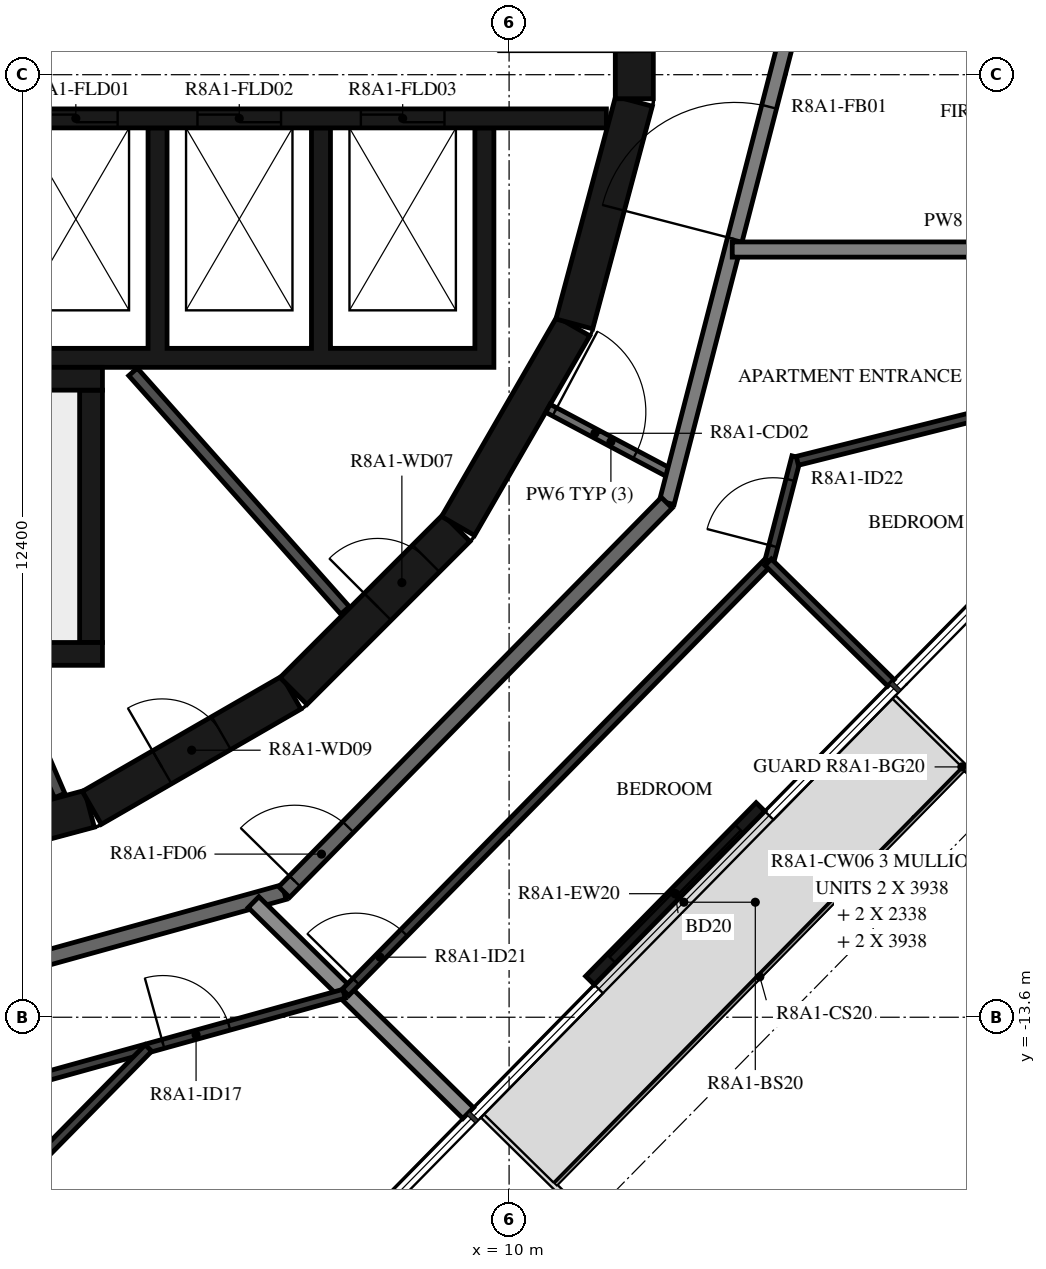
"""IFC4 building model, lengths in metres.
Left out: names, types, materials, properties, quantities, classifications, styles, units other than length and angle.
Written with IfcOpenShell. Run it as: python <this file> out.ifc"""

import sys

from ifc_helpers import new_model, si_unit, direction, frame, frame_2d, origin, place, context, subcontext, project, spatial, polyline, rectangle, outline, extrude, element, fill, save


model = new_model("IFC4")
c1 = context("Model", 3, precision=1e-05, world=origin(), true_north=direction((0.0, 1.0)))
c2 = subcontext(c1, "Body", "Model", "MODEL_VIEW")
j1 = project(units=[si_unit("LENGTHUNIT", "METRE"), si_unit("PLANEANGLEUNIT", "RADIAN")], contexts=[c1])
p1 = place(None, origin())
s1 = spatial("IfcSite", under=j1, at=p1, CompositionType="ELEMENT")
p2 = place(p1, origin())
s2 = spatial("IfcBuilding", under=s1, at=p2, CompositionType="ELEMENT")
p3 = place(p2, frame((0.0, 0.0, 301.7)))
s3 = spatial("IfcBuildingStorey", under=s2, at=p3, CompositionType="ELEMENT", Elevation=301.7)
p4 = place(p3, frame((11.064, -13.116, 0.0), z_axis=(0.0, 0.0, 1.0), x_axis=(0.700900076932, 0.713259477439, 0.0)))
e1 = element("IfcWall", 1, at=p4, inside=s3, PredefinedType="STANDARD", context=c2, shape_type="SweptSolid", body=[
    extrude(rectangle(XDim=3.2, YDim=0.16, at=frame_2d((1.6, 0.0))), origin(), (0.0, 0.0, 1.0), 3.12),
])
p5 = place(p4, frame((0.4, 0.0, 0.0)))
e2 = element("IfcOpeningElement", 2, at=p5, cuts=e1, PredefinedType="OPENING", context=c2, shape_type="SweptSolid", body=[
    extrude(rectangle(XDim=2.4, YDim=2.4, at=frame_2d((1.2, 1.2))), frame((0.0, 0.09, 0.0), z_axis=(0.0, -1.0, 0.0), x_axis=(1.0, 0.0, 0.0)), (0.0, 0.0, 1.0), 0.18),
])
p6 = place(p3, frame((1.55, -11.643, 0.0), z_axis=(0.0, 0.0, 1.0), x_axis=(0.965948410781, 0.258734743916, 0.0)))
e3 = element("IfcWall", 3, at=p6, inside=s3, PredefinedType="SHEAR", context=c2, shape_type="SweptSolid", body=[
    extrude(rectangle(XDim=3.033, YDim=0.5, at=frame_2d((1.516, 0.0))), origin(), (0.0, 0.0, 1.0), 3.12),
])
p7 = place(p6, frame((1.066, 0.0, 0.0)))
e4 = element("IfcOpeningElement", 4, at=p7, cuts=e3, PredefinedType="OPENING", context=c2, shape_type="SweptSolid", body=[
    extrude(rectangle(XDim=0.9, YDim=2.1, at=frame_2d((0.45, 1.05))), frame((0.0, 0.26, 0.0), z_axis=(0.0, -1.0, 0.0), x_axis=(1.0, 0.0, 0.0)), (0.0, 0.0, 1.0), 0.52),
])
p8 = place(p3, frame((4.51, -10.845, 0.0), z_axis=(0.0, 0.0, 1.0), x_axis=(0.865975092491, 0.500087131594, 0.0)))
e5 = element("IfcWall", 5, at=p8, inside=s3, PredefinedType="SHEAR", context=c2, shape_type="SweptSolid", body=[
    extrude(rectangle(XDim=3.033, YDim=0.5, at=frame_2d((1.516, 0.0))), origin(), (0.0, 0.0, 1.0), 3.12),
])
p9 = place(p8, frame((1.066, 0.0, 0.0)))
e6 = element("IfcOpeningElement", 6, at=p9, cuts=e5, PredefinedType="OPENING", context=c2, shape_type="SweptSolid", body=[
    extrude(rectangle(XDim=0.9, YDim=2.1, at=frame_2d((0.45, 1.05))), frame((0.0, 0.26, 0.0), z_axis=(0.0, -1.0, 0.0), x_axis=(1.0, 0.0, 0.0)), (0.0, 0.0, 1.0), 0.52),
])
p10 = place(p3, frame((7.164, -9.308, 0.0), z_axis=(0.0, 0.0, 1.0), x_axis=(0.707106781187, 0.707106781187, 0.0)))
e7 = element("IfcWall", 7, at=p10, inside=s3, PredefinedType="SHEAR", context=c2, shape_type="SweptSolid", body=[
    extrude(rectangle(XDim=3.032, YDim=0.5, at=frame_2d((1.516, 0.0))), origin(), (0.0, 0.0, 1.0), 3.12),
])
p11 = place(p10, frame((1.566, 0.0, 0.0)))
e8 = element("IfcOpeningElement", 8, at=p11, cuts=e7, PredefinedType="OPENING", context=c2, shape_type="SweptSolid", body=[
    extrude(rectangle(XDim=0.9, YDim=2.1, at=frame_2d((0.45, 1.05))), frame((0.0, 0.26, 0.0), z_axis=(0.0, -1.0, 0.0), x_axis=(1.0, 0.0, 0.0)), (0.0, 0.0, 1.0), 0.52),
])
for number, where, z_axis, x_axis in (
    (9, (9.329, -7.137, 0.0), (0.0, 0.0, 1.0), (0.5, 0.866, 0.0)),
    (10, (10.858, -4.479, 0.0), (0.0, 0.0, 1.0), (0.259, 0.966, 0.0)),
):
    element("IfcWall", number, at=place(p3, frame(where, z_axis=z_axis, x_axis=x_axis)), inside=s3, PredefinedType="SHEAR", context=c2, shape_type="SweptSolid", body=[
        extrude(rectangle(XDim=3.033, YDim=0.5, at=frame_2d((1.516, 0.0))), origin(), (0.0, 0.0, 1.0), 3.12),
    ])
p12 = place(p3, frame((11.647, -1.516, 0.0), z_axis=(0.0, 0.0, 1.0), x_axis=(0.0, 1.0, 0.0)))
e11 = element("IfcWall", 11, at=p12, inside=s3, PredefinedType="SHEAR", context=c2, shape_type="SweptSolid", body=[
    extrude(rectangle(XDim=3.033, YDim=0.5, at=frame_2d((1.516, 0.0))), origin(), (0.0, 0.0, 1.0), 3.12),
])
p13 = place(p12, frame((0.616, 0.0, 0.0)))
e12 = element("IfcOpeningElement", 12, at=p13, cuts=e11, PredefinedType="OPENING", context=c2, shape_type="SweptSolid", body=[
    extrude(rectangle(XDim=1.8, YDim=2.1, at=frame_2d((0.9, 1.05))), frame((0.0, 0.26, 0.0), z_axis=(0.0, -1.0, 0.0), x_axis=(1.0, 0.0, 0.0)), (0.0, 0.0, 1.0), 0.52),
])
p14 = place(p3, frame((-2.4, -5.2, 0.0), z_axis=(0.0, 0.0, 1.0), x_axis=(1.0, 0.0, 0.0)))
e13 = element("IfcWall", 13, at=p14, inside=s3, PredefinedType="SHEAR", context=c2, shape_type="SweptSolid", body=[
    extrude(rectangle(XDim=7.05, YDim=0.3, at=frame_2d((3.525, 0.0))), origin(), (0.0, 0.0, 1.0), 3.12),
])
p15 = place(p3, frame((4.5, -8.67, 0.0), z_axis=(0.0, 0.0, 1.0), x_axis=(0.0, 1.0, 0.0)))
e14 = element("IfcWall", 14, at=p15, inside=s3, PredefinedType="SHEAR", context=c2, shape_type="SweptSolid", body=[
    extrude(rectangle(XDim=3.32, YDim=0.3, at=frame_2d((1.66, 0.0))), origin(), (0.0, 0.0, 1.0), 3.12),
])
p16 = place(p3, frame((0.1, -8.82, 0.0), z_axis=(0.0, 0.0, 1.0), x_axis=(1.0, 0.0, 0.0)))
e15 = element("IfcWall", 15, at=p16, inside=s3, PredefinedType="SHEAR", context=c2, shape_type="SweptSolid", body=[
    extrude(rectangle(XDim=4.55, YDim=0.3, at=frame_2d((2.275, 0.0))), origin(), (0.0, 0.0, 1.0), 3.12),
])
p17 = place(p3, origin())
e16 = element("IfcWall", 16, at=p17, inside=s3, PredefinedType="SHEAR", context=c2, shape_type="SweptSolid", body=[
    extrude(outline(polyline([(9.8, -5.05), (9.8, -4.8), (9.8, -1.9), (9.55, -1.9), (9.55, -4.8), (7.65, -4.8), (7.65, -1.9), (7.4, -1.9), (7.4, -4.8), (5.5, -4.8), (5.5, -1.9), (5.25, -1.9), (5.25, -4.8), (3.35, -4.8), (3.35, -1.9), (3.1, -1.9), (3.1, -4.8), (1.2, -4.8), (1.2, -1.9), (0.95, -1.9), (0.95, -4.8), (-0.95, -4.8), (-0.95, -1.9), (-1.2, -1.9), (-1.2, -4.8), (-3.1, -4.8), (-3.1, -1.9), (-3.35, -1.9), (-3.35, -4.8), (-5.25, -4.8), (-5.25, -1.9), (-5.5, -1.9), (-5.5, -4.8), (-9.55, -4.8), (-9.55, -1.9), (-9.8, -1.9), (-9.8, -4.8), (-9.8, -5.05), (9.8, -5.05)])), origin(), (0.0, 0.0, 1.0), 3.12),
])
p18 = place(p3, frame((3.35, -1.775, 0.0), z_axis=(0.0, 0.0, 1.0), x_axis=(1.0, 0.0, 0.0)))
e17 = element("IfcWall", 17, at=p18, inside=s3, PredefinedType="SHEAR", context=c2, shape_type="SweptSolid", body=[
    extrude(rectangle(XDim=7.93, YDim=0.25, at=frame_2d((3.965, 0.0))), origin(), (0.0, 0.0, 1.0), 3.12),
])
p19 = place(p18, frame((0.4, 0.0, 0.0)))
e18 = element("IfcOpeningElement", 18, at=p19, cuts=e17, PredefinedType="OPENING", context=c2, shape_type="SweptSolid", body=[
    extrude(rectangle(XDim=1.1, YDim=2.4, at=frame_2d((0.55, 1.2))), frame((0.0, 0.135, 0.0), z_axis=(0.0, -1.0, 0.0), x_axis=(1.0, 0.0, 0.0)), (0.0, 0.0, 1.0), 0.27),
])
p20 = place(p18, frame((2.55, 0.0, 0.0)))
e19 = element("IfcOpeningElement", 19, at=p20, cuts=e17, PredefinedType="OPENING", context=c2, shape_type="SweptSolid", body=[
    extrude(rectangle(XDim=1.1, YDim=2.4, at=frame_2d((0.55, 1.2))), frame((0.0, 0.135, 0.0), z_axis=(0.0, -1.0, 0.0), x_axis=(1.0, 0.0, 0.0)), (0.0, 0.0, 1.0), 0.27),
])
p21 = place(p18, frame((4.7, 0.0, 0.0)))
e20 = element("IfcOpeningElement", 20, at=p21, cuts=e17, PredefinedType="OPENING", context=c2, shape_type="SweptSolid", body=[
    extrude(rectangle(XDim=1.1, YDim=2.4, at=frame_2d((0.55, 1.2))), frame((0.0, 0.135, 0.0), z_axis=(0.0, -1.0, 0.0), x_axis=(1.0, 0.0, 0.0)), (0.0, 0.0, 1.0), 0.27),
])
p22 = place(p3, frame((7.842, -8.248, 0.0), z_axis=(0.0, 0.0, 1.0), x_axis=(-0.66446128181, 0.747322691329, 0.0)))
e21 = element("IfcWall", 21, at=p22, inside=s3, PredefinedType="PARTITIONING", context=c2, shape_type="SweptSolid", body=[
    extrude(rectangle(XDim=4.198, YDim=0.15, at=frame_2d((2.099, 0.0))), origin(), (0.0, 0.0, 1.0), 3.12),
])
p23 = place(p3, frame((3.367, -9.007, 0.0), z_axis=(0.0, 0.0, 1.0), x_axis=(0.394387482265, -0.918944238696, 0.0)))
e22 = element("IfcWall", 22, at=p23, inside=s3, PredefinedType="PARTITIONING", context=c2, shape_type="SweptSolid", body=[
    extrude(rectangle(XDim=1.825, YDim=0.15, at=frame_2d((0.913, 0.0))), origin(), (0.0, 0.0, 1.0), 3.12),
])
p24 = place(p3, frame((10.511, -5.589, 0.0), z_axis=(0.0, 0.0, 1.0), x_axis=(0.882957311919, -0.469453283437, 0.0)))
e23 = element("IfcWall", 23, at=p24, inside=s3, PredefinedType="PARTITIONING", context=c2, shape_type="SweptSolid", body=[
    extrude(rectangle(XDim=1.876, YDim=0.12, at=frame_2d((0.938, 0.0))), origin(), (0.0, 0.0, 1.0), 3.12),
])
p25 = place(p24, frame((0.1, 0.0, 0.0)))
e24 = element("IfcOpeningElement", 24, at=p25, cuts=e23, PredefinedType="OPENING", context=c2, shape_type="SweptSolid", body=[
    extrude(rectangle(XDim=1.2, YDim=2.1, at=frame_2d((0.6, 1.05))), frame((0.0, 0.07, 0.0), z_axis=(0.0, -1.0, 0.0), x_axis=(1.0, 0.0, 0.0)), (0.0, 0.0, 1.0), 0.14),
])
p26 = place(p3, frame((12.074, -6.831, 0.0), z_axis=(0.0, 0.0, 1.0), x_axis=(0.250391063186, 0.968144780225, 0.0)))
e25 = element("IfcWall", 25, at=p26, inside=s3, PredefinedType="STANDARD", context=c2, shape_type="SweptSolid", body=[
    extrude(rectangle(XDim=7.181, YDim=0.2, at=frame_2d((3.591, 0.0))), origin(), (0.0, 0.0, 1.0), 3.12),
])
p27 = place(p26, frame((3.581, 0.0, 0.0)))
e26 = element("IfcOpeningElement", 26, at=p27, cuts=e25, PredefinedType="OPENING", context=c2, shape_type="SweptSolid", body=[
    extrude(rectangle(XDim=1.8, YDim=2.1, at=frame_2d((0.9, 1.05))), frame((0.0, 0.11, 0.0), z_axis=(0.0, -1.0, 0.0), x_axis=(1.0, 0.0, 0.0)), (0.0, 0.0, 1.0), 0.22),
])
p28 = place(p3, frame((0.121, -13.872, 0.0), z_axis=(0.0, 0.0, 1.0), x_axis=(0.963625960674, 0.267254575108, 0.0)))
e27 = element("IfcWall", 27, at=p28, inside=s3, PredefinedType="STANDARD", context=c2, shape_type="SweptSolid", body=[
    extrude(rectangle(XDim=7.181, YDim=0.2, at=frame_2d((3.591, 0.0))), origin(), (0.0, 0.0, 1.0), 3.12),
])
p29 = place(p3, frame((7.041, -11.953, 0.0), z_axis=(0.0, 0.0, 1.0), x_axis=(0.70090916255, 0.713250549143, 0.0)))
e28 = element("IfcWall", 28, at=p29, inside=s3, PredefinedType="STANDARD", context=c2, shape_type="SweptSolid", body=[
    extrude(rectangle(XDim=7.181, YDim=0.2, at=frame_2d((3.59, 0.0))), origin(), (0.0, 0.0, 1.0), 3.12),
])
p30 = place(p29, frame((0.2, 0.0, 0.0)))
e29 = element("IfcOpeningElement", 29, at=p30, cuts=e28, PredefinedType="OPENING", context=c2, shape_type="SweptSolid", body=[
    extrude(rectangle(XDim=1.0, YDim=2.1, at=frame_2d((0.5, 1.05))), frame((0.0, 0.11, 0.0), z_axis=(0.0, -1.0, 0.0), x_axis=(1.0, 0.0, 0.0)), (0.0, 0.0, 1.0), 0.22),
])
p31 = place(p3, frame((12.936, -3.5, 0.0), z_axis=(0.0, 0.0, 1.0), x_axis=(1.0, 0.0, 0.0)))
e30 = element("IfcWall", 30, at=p31, inside=s3, PredefinedType="STANDARD", context=c2, shape_type="SweptSolid", body=[
    extrude(rectangle(XDim=6.464, YDim=0.2, at=frame_2d((3.232, 0.0))), origin(), (0.0, 0.0, 1.0), 3.12),
])
p32 = place(p3, frame((9.462, -14.861, 0.0), z_axis=(0.0, 0.0, 1.0), x_axis=(-0.713276937124, 0.700882308927, 0.0)))
e31 = element("IfcWall", 31, at=p32, inside=s3, PredefinedType="STANDARD", context=c2, shape_type="SweptSolid", body=[
    extrude(rectangle(XDim=3.959, YDim=0.2, at=frame_2d((1.979, 0.0))), origin(), (0.0, 0.0, 1.0), 2.73),
])
p33 = place(p3, frame((0.21, -15.404, 0.0), z_axis=(0.0, 0.0, 1.0), x_axis=(0.963630625717, 0.267237754032, 0.0)))
e32 = element("IfcWall", 32, at=p33, inside=s3, PredefinedType="PARTITIONING", context=c2, shape_type="SweptSolid", body=[
    extrude(rectangle(XDim=7.907, YDim=0.12, at=frame_2d((3.954, 0.0))), origin(), (0.0, 0.0, 1.0), 3.12),
])
p34 = place(p33, frame((0.4, 0.0, 0.0)))
e33 = element("IfcOpeningElement", 33, at=p34, cuts=e32, PredefinedType="OPENING", context=c2, shape_type="SweptSolid", body=[
    extrude(rectangle(XDim=0.8, YDim=2.1, at=frame_2d((0.4, 1.05))), frame((0.0, 0.07, 0.0), z_axis=(0.0, -1.0, 0.0), x_axis=(1.0, 0.0, 0.0)), (0.0, 0.0, 1.0), 0.14),
])
p35 = place(p33, frame((5.436, 0.0, 0.0)))
e34 = element("IfcOpeningElement", 34, at=p35, cuts=e32, PredefinedType="OPENING", context=c2, shape_type="SweptSolid", body=[
    extrude(rectangle(XDim=0.9, YDim=2.1, at=frame_2d((0.45, 1.05))), frame((0.0, 0.07, 0.0), z_axis=(0.0, -1.0, 0.0), x_axis=(1.0, 0.0, 0.0)), (0.0, 0.0, 1.0), 0.14),
])
p36 = place(p3, frame((-1.304, -20.68, 0.0), z_axis=(0.0, 0.0, 1.0), x_axis=(0.700896976526, 0.713262524108, 0.0)))
e35 = element("IfcWall", 35, at=p36, inside=s3, PredefinedType="PARTITIONING", context=c2, shape_type="SweptSolid", body=[
    extrude(rectangle(XDim=9.358, YDim=0.12, at=frame_2d((4.679, 0.0))), origin(), (0.0, 0.0, 1.0), 3.12),
])
p37 = place(p36, frame((0.849, 0.0, 0.0)))
e36 = element("IfcOpeningElement", 36, at=p37, cuts=e35, PredefinedType="OPENING", context=c2, shape_type="SweptSolid", body=[
    extrude(rectangle(XDim=0.9, YDim=2.1, at=frame_2d((0.45, 1.05))), frame((0.0, 0.07, 0.0), z_axis=(0.0, -1.0, 0.0), x_axis=(1.0, 0.0, 0.0)), (0.0, 0.0, 1.0), 0.14),
])
p38 = place(p3, frame((7.846, -13.273, 0.0), z_axis=(0.0, 0.0, 1.0), x_axis=(0.700911018066, 0.713248725728, 0.0)))
e37 = element("IfcWall", 37, at=p38, inside=s3, PredefinedType="PARTITIONING", context=c2, shape_type="SweptSolid", body=[
    extrude(rectangle(XDim=7.935, YDim=0.12, at=frame_2d((3.968, 0.0))), origin(), (0.0, 0.0, 1.0), 3.12),
])
p39 = place(p38, frame((0.2, 0.0, 0.0)))
e38 = element("IfcOpeningElement", 38, at=p39, cuts=e37, PredefinedType="OPENING", context=c2, shape_type="SweptSolid", body=[
    extrude(rectangle(XDim=0.9, YDim=2.1, at=frame_2d((0.45, 1.05))), frame((0.0, 0.07, 0.0), z_axis=(0.0, -1.0, 0.0), x_axis=(1.0, 0.0, 0.0)), (0.0, 0.0, 1.0), 0.14),
])
p40 = place(p3, frame((13.426, -7.596, 0.0), z_axis=(0.0, 0.0, 1.0), x_axis=(0.250380027586, 0.968147634292, 0.0)))
e39 = element("IfcWall", 39, at=p40, inside=s3, PredefinedType="PARTITIONING", context=c2, shape_type="SweptSolid", body=[
    extrude(rectangle(XDim=1.412, YDim=0.12, at=frame_2d((0.706, 0.0))), origin(), (0.0, 0.0, 1.0), 3.12),
])
p41 = place(p40, frame((0.2, 0.0, 0.0)))
e40 = element("IfcOpeningElement", 40, at=p41, cuts=e39, PredefinedType="OPENING", context=c2, shape_type="SweptSolid", body=[
    extrude(rectangle(XDim=0.9, YDim=2.1, at=frame_2d((0.45, 1.05))), frame((0.0, 0.07, 0.0), z_axis=(0.0, -1.0, 0.0), x_axis=(1.0, 0.0, 0.0)), (0.0, 0.0, 1.0), 0.14),
])
p42 = place(p3, frame((13.792, -6.28, 0.0), z_axis=(0.0, 0.0, 1.0), x_axis=(0.970009253073, 0.243067992449, 0.0)))
e41 = element("IfcWall", 41, at=p42, inside=s3, PredefinedType="PARTITIONING", context=c2, shape_type="SweptSolid", body=[
    extrude(rectangle(XDim=5.611, YDim=0.12, at=frame_2d((2.805, 0.0))), origin(), (0.0, 0.0, 1.0), 3.12),
])
p43 = place(p3, frame((15.024, -9.201, 0.0), z_axis=(0.0, 0.0, 1.0), x_axis=(-0.713331704042, 0.700826569137, 0.0)))
e42 = element("IfcWall", 42, at=p43, inside=s3, PredefinedType="PARTITIONING", context=c2, shape_type="SweptSolid", body=[
    extrude(rectangle(XDim=2.265, YDim=0.12, at=frame_2d((1.132, 0.0))), origin(), (0.0, 0.0, 1.0), 2.73),
])
p44 = place(p5, origin())
e43 = element("IfcDoor", 43, at=p44, inside=s3, OperationType="DOUBLE_DOOR_SLIDING", PredefinedType="DOOR", context=c2, shape_type="SweptSolid", body=[
    extrude(rectangle(XDim=2.4, YDim=2.4, at=frame_2d((1.2, 1.2))), frame((0.0, 0.025, 0.0), z_axis=(0.0, -1.0, 0.0), x_axis=(1.0, 0.0, 0.0)), (0.0, 0.0, 1.0), 0.05),
])
fill(e2, e43)
p45 = place(p13, origin())
e44 = element("IfcDoor", 44, at=p45, inside=s3, OperationType="DOUBLE_DOOR_SINGLE_SWING", PredefinedType="DOOR", context=c2, shape_type="SweptSolid", body=[
    extrude(rectangle(XDim=1.8, YDim=2.1, at=frame_2d((0.9, 1.05))), frame((0.0, 0.025, 0.0), z_axis=(0.0, -1.0, 0.0), x_axis=(1.0, 0.0, 0.0)), (0.0, 0.0, 1.0), 0.05),
])
fill(e12, e44)
p46 = place(p19, origin())
e45 = element("IfcDoor", 45, at=p46, inside=s3, OperationType="DOUBLE_DOOR_SLIDING", PredefinedType="DOOR", context=c2, shape_type="SweptSolid", body=[
    extrude(rectangle(XDim=1.1, YDim=2.4, at=frame_2d((0.55, 1.2))), frame((0.0, 0.025, 0.0), z_axis=(0.0, -1.0, 0.0), x_axis=(1.0, 0.0, 0.0)), (0.0, 0.0, 1.0), 0.05),
])
fill(e18, e45)
p47 = place(p20, origin())
e46 = element("IfcDoor", 46, at=p47, inside=s3, OperationType="DOUBLE_DOOR_SLIDING", PredefinedType="DOOR", context=c2, shape_type="SweptSolid", body=[
    extrude(rectangle(XDim=1.1, YDim=2.4, at=frame_2d((0.55, 1.2))), frame((0.0, 0.025, 0.0), z_axis=(0.0, -1.0, 0.0), x_axis=(1.0, 0.0, 0.0)), (0.0, 0.0, 1.0), 0.05),
])
fill(e19, e46)
p48 = place(p21, origin())
e47 = element("IfcDoor", 47, at=p48, inside=s3, OperationType="DOUBLE_DOOR_SLIDING", PredefinedType="DOOR", context=c2, shape_type="SweptSolid", body=[
    extrude(rectangle(XDim=1.1, YDim=2.4, at=frame_2d((0.55, 1.2))), frame((0.0, 0.025, 0.0), z_axis=(0.0, -1.0, 0.0), x_axis=(1.0, 0.0, 0.0)), (0.0, 0.0, 1.0), 0.05),
])
fill(e20, e47)
p49 = place(p11, origin())
e48 = element("IfcDoor", 48, at=p49, inside=s3, OperationType="SINGLE_SWING_LEFT", PredefinedType="DOOR", context=c2, shape_type="SweptSolid", body=[
    extrude(rectangle(XDim=0.9, YDim=2.1, at=frame_2d((0.45, 1.05))), frame((0.0, 0.025, 0.0), z_axis=(0.0, -1.0, 0.0), x_axis=(1.0, 0.0, 0.0)), (0.0, 0.0, 1.0), 0.05),
])
fill(e8, e48)
p50 = place(p9, origin())
e49 = element("IfcDoor", 49, at=p50, inside=s3, OperationType="SINGLE_SWING_LEFT", PredefinedType="DOOR", context=c2, shape_type="SweptSolid", body=[
    extrude(rectangle(XDim=0.9, YDim=2.1, at=frame_2d((0.45, 1.05))), frame((0.0, 0.025, 0.0), z_axis=(0.0, -1.0, 0.0), x_axis=(1.0, 0.0, 0.0)), (0.0, 0.0, 1.0), 0.05),
])
fill(e6, e49)
p51 = place(p35, origin())
e50 = element("IfcDoor", 50, at=p51, inside=s3, OperationType="SINGLE_SWING_LEFT", PredefinedType="DOOR", context=c2, shape_type="SweptSolid", body=[
    extrude(rectangle(XDim=0.9, YDim=2.1, at=frame_2d((0.45, 1.05))), frame((0.0, 0.025, 0.0), z_axis=(0.0, -1.0, 0.0), x_axis=(1.0, 0.0, 0.0)), (0.0, 0.0, 1.0), 0.05),
])
fill(e34, e50)
p52 = place(p30, origin())
e51 = element("IfcDoor", 51, at=p52, inside=s3, OperationType="SINGLE_SWING_LEFT", PredefinedType="DOOR", context=c2, shape_type="SweptSolid", body=[
    extrude(rectangle(XDim=1.0, YDim=2.1, at=frame_2d((0.5, 1.05))), frame((0.0, 0.025, 0.0), z_axis=(0.0, -1.0, 0.0), x_axis=(1.0, 0.0, 0.0)), (0.0, 0.0, 1.0), 0.05),
])
fill(e29, e51)
p53 = place(p39, origin())
e52 = element("IfcDoor", 52, at=p53, inside=s3, OperationType="SINGLE_SWING_LEFT", PredefinedType="DOOR", context=c2, shape_type="SweptSolid", body=[
    extrude(rectangle(XDim=0.9, YDim=2.1, at=frame_2d((0.45, 1.05))), frame((0.0, 0.025, 0.0), z_axis=(0.0, -1.0, 0.0), x_axis=(1.0, 0.0, 0.0)), (0.0, 0.0, 1.0), 0.05),
])
fill(e38, e52)
p54 = place(p41, origin())
e53 = element("IfcDoor", 53, at=p54, inside=s3, OperationType="SINGLE_SWING_RIGHT", PredefinedType="DOOR", context=c2, shape_type="SweptSolid", body=[
    extrude(rectangle(XDim=0.9, YDim=2.1, at=frame_2d((0.45, 1.05))), frame((0.0, 0.025, 0.0), z_axis=(0.0, -1.0, 0.0), x_axis=(1.0, 0.0, 0.0)), (0.0, 0.0, 1.0), 0.05),
])
fill(e40, e53)
p55 = place(p25, origin())
e54 = element("IfcDoor", 54, at=p55, inside=s3, OperationType="DOUBLE_DOOR_SINGLE_SWING", PredefinedType="DOOR", context=c2, shape_type="SweptSolid", body=[
    extrude(rectangle(XDim=1.2, YDim=2.1, at=frame_2d((0.6, 1.05))), frame((0.0, 0.025, 0.0), z_axis=(0.0, -1.0, 0.0), x_axis=(1.0, 0.0, 0.0)), (0.0, 0.0, 1.0), 0.05),
])
fill(e24, e54)
p56 = place(p27, origin())
e55 = element("IfcDoor", 55, at=p56, inside=s3, OperationType="DOUBLE_DOOR_SINGLE_SWING", PredefinedType="DOOR", context=c2, shape_type="SweptSolid", body=[
    extrude(rectangle(XDim=1.8, YDim=2.1, at=frame_2d((0.9, 1.05))), frame((0.0, 0.025, 0.0), z_axis=(0.0, -1.0, 0.0), x_axis=(1.0, 0.0, 0.0)), (0.0, 0.0, 1.0), 0.05),
])
fill(e26, e55)
save(model, sys.argv[1])
